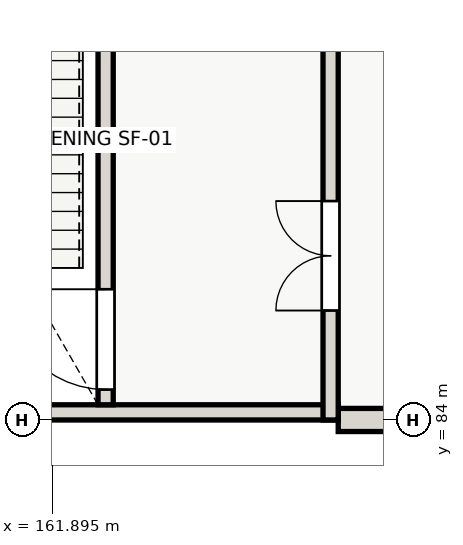
"""IFC4 building model, lengths in metres.
Left out: names, types, materials, properties, quantities, classifications, styles, units other than length and angle.
Written with IfcOpenShell. Run it as: python <this file> out.ifc"""

import sys

from ifc_helpers import new_model, si_unit, direction, frame, frame_2d, origin, place, context, subcontext, project, spatial, rectangle, extrude, element, fill, save


model = new_model("IFC4")
c1 = context("Model", 3, precision=1e-05, world=origin(), true_north=direction((0.0, 1.0)))
c2 = subcontext(c1, "Body", "Model", "MODEL_VIEW")
j1 = project(units=[si_unit("LENGTHUNIT", "METRE"), si_unit("PLANEANGLEUNIT", "RADIAN")], contexts=[c1])
p1 = place(None, origin())
s1 = spatial("IfcSite", under=j1, at=p1, CompositionType="ELEMENT")
p2 = place(p1, origin())
s2 = spatial("IfcBuilding", under=s1, at=p2, CompositionType="ELEMENT")
p3 = place(p2, frame((0.0, 0.0, 8.4)))
s3 = spatial("IfcBuildingStorey", under=s2, at=p3, CompositionType="ELEMENT", Elevation=8.4)
p4 = place(p3, frame((168.0, 84.0, 0.0), z_axis=(0.0, 0.0, 1.0), x_axis=(-1.0, 0.0, 0.0)))
e1 = element("IfcWall", 1, at=p4, inside=s3, PredefinedType="SOLIDWALL", context=c2, shape_type="SweptSolid", body=[
    extrude(rectangle(XDim=1.4, YDim=0.38, at=frame_2d((0.7, 0.0))), origin(), (0.0, 0.0, 1.0), 3.58),
])
p5 = place(p3, frame((166.6, 84.125, 0.0), z_axis=(0.0, 0.0, 1.0), x_axis=(-1.0, 0.0, 0.0)))
e2 = element("IfcWall", 2, at=p5, inside=s3, PredefinedType="SHEAR", context=c2, shape_type="SweptSolid", body=[
    extrude(rectangle(XDim=9.2, YDim=0.25, at=frame_2d((4.6, 0.0))), origin(), (0.0, 0.0, 1.0), 4.2),
])
p6 = place(p3, frame((166.475, 84.0, 0.0), z_axis=(0.0, 0.0, 1.0), x_axis=(0.0, 1.0, 0.0)))
e3 = element("IfcWall", 3, at=p6, inside=s3, PredefinedType="SHEAR", context=c2, shape_type="SweptSolid", body=[
    extrude(rectangle(XDim=9.2, YDim=0.25, at=frame_2d((4.6, 0.0))), origin(), (0.0, 0.0, 1.0), 4.2),
])
p7 = place(p6, frame((1.8, 0.0, 0.0)))
e4 = element("IfcOpeningElement", 4, at=p7, cuts=e3, PredefinedType="OPENING", context=c2, shape_type="SweptSolid", body=[
    extrude(rectangle(XDim=1.8, YDim=2.15, at=frame_2d((0.9, 1.075))), frame((0.0, 0.135, 0.0), z_axis=(0.0, -1.0, 0.0), x_axis=(1.0, 0.0, 0.0)), (0.0, 0.0, 1.0), 0.27),
])
p8 = place(p3, frame((162.775, 84.25, 0.0), z_axis=(0.0, 0.0, 1.0), x_axis=(0.0, 1.0, 0.0)))
e5 = element("IfcWall", 5, at=p8, inside=s3, PredefinedType="SHEAR", context=c2, shape_type="SweptSolid", body=[
    extrude(rectangle(XDim=8.7, YDim=0.25, at=frame_2d((4.35, 0.0))), origin(), (0.0, 0.0, 1.0), 4.2),
])
p9 = place(p8, frame((0.25, 0.0, 0.0)))
e6 = element("IfcOpeningElement", 6, at=p9, cuts=e5, PredefinedType="OPENING", context=c2, shape_type="SweptSolid", body=[
    extrude(rectangle(XDim=1.65, YDim=2.1, at=frame_2d((0.825, 1.05))), frame((0.0, 0.135, 0.0), z_axis=(0.0, -1.0, 0.0), x_axis=(1.0, 0.0, 0.0)), (0.0, 0.0, 1.0), 0.27),
])
p10 = place(p7, origin())
e7 = element("IfcDoor", 7, at=p10, inside=s3, OperationType="DOUBLE_DOOR_SINGLE_SWING", PredefinedType="DOOR", context=c2, shape_type="SweptSolid", body=[
    extrude(rectangle(XDim=1.8, YDim=2.15, at=frame_2d((0.9, 1.075))), frame((0.0, 0.025, 0.0), z_axis=(0.0, -1.0, 0.0), x_axis=(1.0, 0.0, 0.0)), (0.0, 0.0, 1.0), 0.05),
])
fill(e4, e7)
p11 = place(p9, origin())
e8 = element("IfcDoor", 8, at=p11, inside=s3, OperationType="SINGLE_SWING_RIGHT", PredefinedType="DOOR", context=c2, shape_type="SweptSolid", body=[
    extrude(rectangle(XDim=1.65, YDim=2.1, at=frame_2d((0.825, 1.05))), frame((0.0, 0.025, 0.0), z_axis=(0.0, -1.0, 0.0), x_axis=(1.0, 0.0, 0.0)), (0.0, 0.0, 1.0), 0.05),
])
fill(e6, e8)
save(model, sys.argv[1])
